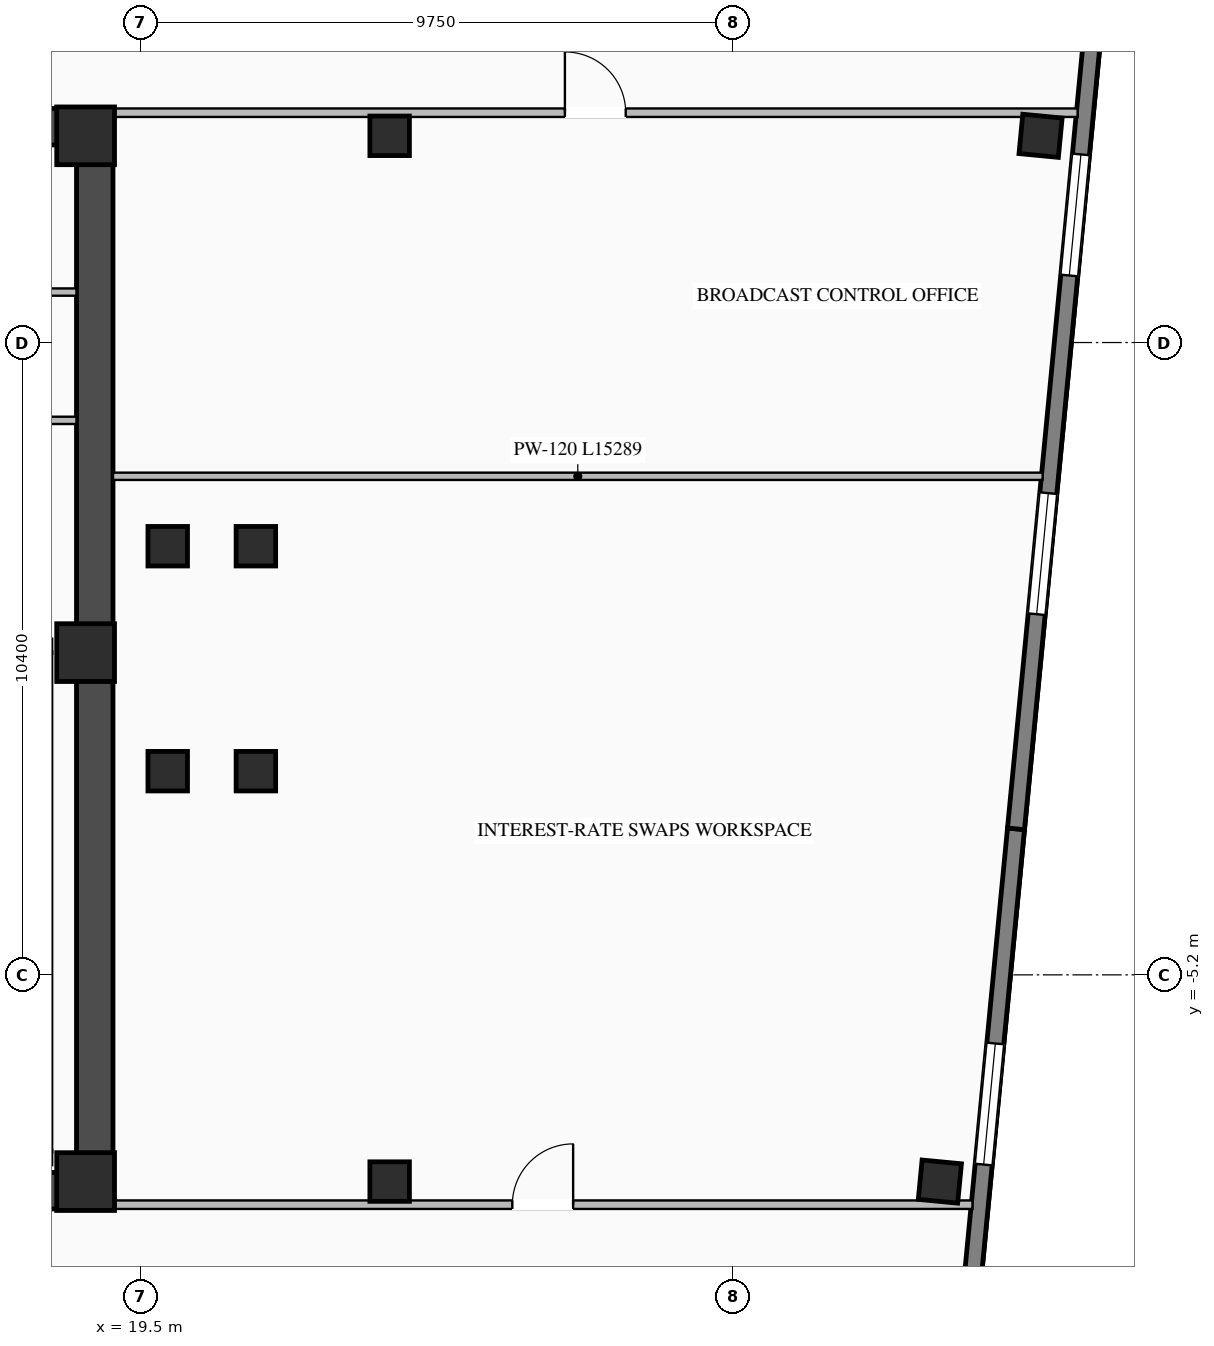
"""IFC4 building model, lengths in metres.
Left out: names, types, materials, properties, quantities, classifications, styles, units other than length and angle.
Written with IfcOpenShell. Run it as: python <this file> out.ifc"""

import sys

from ifc_helpers import new_model, si_unit, direction, frame, frame_2d, origin, origin_2d, place, context, subcontext, project, spatial, rectangle, i_section, extrude, element, fill, save


model = new_model("IFC4")
c1 = context("Model", 3, precision=1e-05, world=origin(), true_north=direction((0.0, 1.0)))
c2 = subcontext(c1, "Body", "Model", "MODEL_VIEW")
j1 = project(units=[si_unit("LENGTHUNIT", "METRE"), si_unit("PLANEANGLEUNIT", "RADIAN")], contexts=[c1])
p1 = place(None, origin())
s1 = spatial("IfcSite", under=j1, at=p1, CompositionType="ELEMENT")
p2 = place(p1, origin())
s2 = spatial("IfcBuilding", under=s1, at=p2, CompositionType="ELEMENT")
p3 = place(p2, frame((0.0, 0.0, 170.75)))
s3 = spatial("IfcBuildingStorey", under=s2, at=p3, CompositionType="ELEMENT", Elevation=170.75)
p4 = place(p3, frame((8.8, -8.75, 0.0), z_axis=(0.0, 0.0, 1.0), x_axis=(1.0, 0.0, 0.0)))
e1 = element("IfcWall", 1, at=p4, inside=s3, PredefinedType="SHEAR", context=c2, shape_type="SweptSolid", body=[
    extrude(rectangle(XDim=10.25, YDim=0.6, at=frame_2d((5.125, 0.0))), origin(), (0.0, 0.0, 1.0), 3.27),
])
p5 = place(p3, frame((8.8, 8.75, 0.0), z_axis=(0.0, 0.0, 1.0), x_axis=(1.0, 0.0, 0.0)))
e2 = element("IfcWall", 2, at=p5, inside=s3, PredefinedType="SHEAR", context=c2, shape_type="SweptSolid", body=[
    extrude(rectangle(XDim=10.25, YDim=0.6, at=frame_2d((5.125, 0.0))), origin(), (0.0, 0.0, 1.0), 3.27),
])
p6 = place(p5, frame((3.25, 0.0, 0.0)))
e3 = element("IfcOpeningElement", 3, at=p6, cuts=e2, PredefinedType="OPENING", context=c2, shape_type="SweptSolid", body=[
    extrude(rectangle(XDim=1.4, YDim=2.05, at=frame_2d((0.7, 1.025))), frame((0.0, 0.31, 0.0), z_axis=(0.0, -1.0, 0.0), x_axis=(1.0, 0.0, 0.0)), (0.0, 0.0, 1.0), 0.62),
])
p7 = place(p3, frame((18.75, -8.45, 0.0), z_axis=(0.0, 0.0, 1.0), x_axis=(0.0, 1.0, 0.0)))
e4 = element("IfcWall", 4, at=p7, inside=s3, PredefinedType="SHEAR", context=c2, shape_type="SweptSolid", body=[
    extrude(rectangle(XDim=16.9, YDim=0.6, at=frame_2d((8.45, 0.0))), origin(), (0.0, 0.0, 1.0), 3.27),
])
for number, where, z_axis, x_axis in (
    (5, (18.6, -8.6, 0.0), (0.0, 0.0, 1.0), (1.0, 0.0, 0.0)),
    (6, (18.6, 0.1, 0.0), (0.0, 0.0, 1.0), (1.0, 0.0, 0.0)),
    (7, (18.6, 8.6, 0.0), (0.0, 0.0, 1.0), (1.0, 0.0, 0.0)),
):
    element("IfcColumn", number, at=place(p3, frame(where, z_axis=z_axis, x_axis=x_axis)), inside=s3, PredefinedType="COLUMN", context=c2, shape_type="SweptSolid", body=[
        extrude(rectangle(XDim=0.95, YDim=0.95, at=origin_2d()), origin(), (0.0, 0.0, 1.0), 3.45),
    ])
for number, where, z_axis, x_axis in (
    (8, (19.95, -1.85, 0.0), (0.0, 0.0, 1.0), (1.0, 0.0, 0.0)),
    (9, (19.95, 1.85, 0.0), (0.0, 0.0, 1.0), (1.0, 0.0, 0.0)),
    (10, (21.4, -1.85, 0.0), (0.0, 0.0, 1.0), (1.0, 0.0, 0.0)),
    (11, (21.4, 1.85, 0.0), (0.0, 0.0, 1.0), (1.0, 0.0, 0.0)),
    (12, (23.6, -8.6, 0.0), (0.0, 0.0, 1.0), (1.0, 0.0, 0.0)),
    (13, (23.6, 8.6, 0.0), (0.0, 0.0, 1.0), (1.0, 0.0, 0.0)),
    (14, (32.649, -8.6, 0.0), (0.0, 0.0, 1.0), (0.995, -0.096, 0.0)),
    (15, (34.305, 8.6, 0.0), (0.0, 0.0, 1.0), (0.995, -0.096, 0.0)),
):
    element("IfcColumn", number, at=place(p3, frame(where, z_axis=z_axis, x_axis=x_axis)), inside=s3, PredefinedType="COLUMN", context=c2, shape_type="SweptSolid", body=[
        extrude(i_section(OverallWidth=0.65, OverallDepth=0.65, WebThickness=0.028, FlangeThickness=0.04, at=origin_2d()), origin(), (0.0, 0.0, 1.0), 3.45),
    ])
p8 = place(p3, frame((33.901, -2.798, 0.0), z_axis=(0.0, 0.0, 1.0), x_axis=(-0.095853434568, -0.99539545864, 0.0)))
e16 = element("IfcWall", 16, at=p8, inside=s3, PredefinedType="STANDARD", context=c2, shape_type="SweptSolid", body=[
    extrude(rectangle(XDim=16.79, YDim=0.28, at=frame_2d((8.395, 0.0))), origin(), (0.0, 0.0, 1.0), 3.25),
])
p9 = place(p8, frame((3.547, 0.0, 0.76)))
e17 = element("IfcOpeningElement", 17, at=p9, cuts=e16, PredefinedType="OPENING", context=c2, shape_type="SweptSolid", body=[
    extrude(rectangle(XDim=2.0, YDim=2.05, at=frame_2d((1.0, 1.025))), frame((0.0, 0.15, 0.0), z_axis=(0.0, -1.0, 0.0), x_axis=(1.0, 0.0, 0.0)), (0.0, 0.0, 1.0), 0.3),
])
p10 = place(p8, frame((10.193, 0.0, 0.76)))
e18 = element("IfcOpeningElement", 18, at=p10, cuts=e16, PredefinedType="OPENING", context=c2, shape_type="SweptSolid", body=[
    extrude(rectangle(XDim=2.0, YDim=2.05, at=frame_2d((1.0, 1.025))), frame((0.0, 0.15, 0.0), z_axis=(0.0, -1.0, 0.0), x_axis=(1.0, 0.0, 0.0)), (0.0, 0.0, 1.0), 0.3),
])
p11 = place(p3, frame((35.51, 13.914, 0.0), z_axis=(0.0, 0.0, 1.0), x_axis=(-0.095839027265, -0.995396845913, 0.0)))
e19 = element("IfcWall", 19, at=p11, inside=s3, PredefinedType="STANDARD", context=c2, shape_type="SweptSolid", body=[
    extrude(rectangle(XDim=16.79, YDim=0.28, at=frame_2d((8.395, 0.0))), origin(), (0.0, 0.0, 1.0), 3.25),
])
p12 = place(p11, frame((5.647, 0.0, 0.76)))
e20 = element("IfcOpeningElement", 20, at=p12, cuts=e19, PredefinedType="OPENING", context=c2, shape_type="SweptSolid", body=[
    extrude(rectangle(XDim=2.0, YDim=2.05, at=frame_2d((1.0, 1.025))), frame((0.0, 0.15, 0.0), z_axis=(0.0, -1.0, 0.0), x_axis=(1.0, 0.0, 0.0)), (0.0, 0.0, 1.0), 0.3),
])
p13 = place(p11, frame((11.243, 0.0, 0.76)))
e21 = element("IfcOpeningElement", 21, at=p13, cuts=e19, PredefinedType="OPENING", context=c2, shape_type="SweptSolid", body=[
    extrude(rectangle(XDim=2.0, YDim=2.05, at=frame_2d((1.0, 1.025))), frame((0.0, 0.15, 0.0), z_axis=(0.0, -1.0, 0.0), x_axis=(1.0, 0.0, 0.0)), (0.0, 0.0, 1.0), 0.3),
])
p14 = place(p3, frame((13.9, 3.92, 0.0), z_axis=(0.0, 0.0, 1.0), x_axis=(1.0, 0.0, 0.0)))
e22 = element("IfcWall", 22, at=p14, inside=s3, PredefinedType="STANDARD", context=c2, shape_type="SweptSolid", body=[
    extrude(rectangle(XDim=4.55, YDim=0.12, at=frame_2d((2.275, 0.0))), origin(), (0.0, 0.0, 1.0), 3.25),
])
p15 = place(p3, frame((16.15, 6.03, 0.0), z_axis=(0.0, 0.0, 1.0), x_axis=(1.0, 0.0, 0.0)))
e23 = element("IfcWall", 23, at=p15, inside=s3, PredefinedType="STANDARD", context=c2, shape_type="SweptSolid", body=[
    extrude(rectangle(XDim=2.3, YDim=0.12, at=frame_2d((1.15, 0.0))), origin(), (0.0, 0.0, 1.0), 3.25),
])
p16 = place(p3, frame((19.05, 8.98, 0.0), z_axis=(0.0, 0.0, 1.0), x_axis=(1.0, 0.0, 0.0)))
e24 = element("IfcWall", 24, at=p16, inside=s3, PredefinedType="STANDARD", context=c2, shape_type="SweptSolid", body=[
    extrude(rectangle(XDim=15.864, YDim=0.14, at=frame_2d((7.932, 0.0))), origin(), (0.0, 0.0, 1.0), 3.25),
])
p17 = place(p16, frame((7.432, 0.0, 0.0)))
e25 = element("IfcOpeningElement", 25, at=p17, cuts=e24, PredefinedType="OPENING", context=c2, shape_type="SweptSolid", body=[
    extrude(rectangle(XDim=1.0, YDim=2.08, at=frame_2d((0.5, 1.04))), frame((0.0, 0.08, 0.0), z_axis=(0.0, -1.0, 0.0), x_axis=(1.0, 0.0, 0.0)), (0.0, 0.0, 1.0), 0.16),
])
p18 = place(p3, frame((19.05, -8.98, 0.0), z_axis=(0.0, 0.0, 1.0), x_axis=(1.0, 0.0, 0.0)))
e26 = element("IfcWall", 26, at=p18, inside=s3, PredefinedType="STANDARD", context=c2, shape_type="SweptSolid", body=[
    extrude(rectangle(XDim=14.135, YDim=0.14, at=frame_2d((7.067, 0.0))), origin(), (0.0, 0.0, 1.0), 3.25),
])
p19 = place(p18, frame((6.567, 0.0, 0.0)))
e27 = element("IfcOpeningElement", 27, at=p19, cuts=e26, PredefinedType="OPENING", context=c2, shape_type="SweptSolid", body=[
    extrude(rectangle(XDim=1.0, YDim=2.08, at=frame_2d((0.5, 1.04))), frame((0.0, 0.08, 0.0), z_axis=(0.0, -1.0, 0.0), x_axis=(1.0, 0.0, 0.0)), (0.0, 0.0, 1.0), 0.16),
])
p20 = place(p3, frame((19.05, 3.0, 0.0), z_axis=(0.0, 0.0, 1.0), x_axis=(1.0, 0.0, 0.0)))
e28 = element("IfcWall", 28, at=p20, inside=s3, PredefinedType="STANDARD", context=c2, shape_type="SweptSolid", body=[
    extrude(rectangle(XDim=15.288, YDim=0.12, at=frame_2d((7.644, 0.0))), origin(), (0.0, 0.0, 1.0), 3.25),
])
p21 = place(p9, origin())
e29 = element("IfcWindow", 29, at=p21, inside=s3, PartitioningType="DOUBLE_PANEL_VERTICAL", PredefinedType="WINDOW", context=c2, shape_type="SweptSolid", body=[
    extrude(rectangle(XDim=2.0, YDim=2.05, at=frame_2d((1.0, 1.025))), frame((0.0, 0.03, 0.0), z_axis=(0.0, -1.0, 0.0), x_axis=(1.0, 0.0, 0.0)), (0.0, 0.0, 1.0), 0.06),
])
fill(e17, e29)
p22 = place(p12, origin())
e30 = element("IfcWindow", 30, at=p22, inside=s3, PartitioningType="DOUBLE_PANEL_VERTICAL", PredefinedType="WINDOW", context=c2, shape_type="SweptSolid", body=[
    extrude(rectangle(XDim=2.0, YDim=2.05, at=frame_2d((1.0, 1.025))), frame((0.0, 0.03, 0.0), z_axis=(0.0, -1.0, 0.0), x_axis=(1.0, 0.0, 0.0)), (0.0, 0.0, 1.0), 0.06),
])
fill(e20, e30)
p23 = place(p13, origin())
e31 = element("IfcWindow", 31, at=p23, inside=s3, PartitioningType="DOUBLE_PANEL_VERTICAL", PredefinedType="WINDOW", context=c2, shape_type="SweptSolid", body=[
    extrude(rectangle(XDim=2.0, YDim=2.05, at=frame_2d((1.0, 1.025))), frame((0.0, 0.03, 0.0), z_axis=(0.0, -1.0, 0.0), x_axis=(1.0, 0.0, 0.0)), (0.0, 0.0, 1.0), 0.06),
])
fill(e21, e31)
p24 = place(p17, origin())
e32 = element("IfcDoor", 32, at=p24, inside=s3, OperationType="SINGLE_SWING_LEFT", PredefinedType="DOOR", context=c2, shape_type="SweptSolid", body=[
    extrude(rectangle(XDim=1.0, YDim=2.08, at=frame_2d((0.5, 1.04))), frame((0.0, 0.025, 0.0), z_axis=(0.0, -1.0, 0.0), x_axis=(1.0, 0.0, 0.0)), (0.0, 0.0, 1.0), 0.05),
])
fill(e25, e32)
p25 = place(p19, origin())
e33 = element("IfcDoor", 33, at=p25, inside=s3, OperationType="SINGLE_SWING_RIGHT", PredefinedType="DOOR", context=c2, shape_type="SweptSolid", body=[
    extrude(rectangle(XDim=1.0, YDim=2.08, at=frame_2d((0.5, 1.04))), frame((0.0, 0.025, 0.0), z_axis=(0.0, -1.0, 0.0), x_axis=(1.0, 0.0, 0.0)), (0.0, 0.0, 1.0), 0.05),
])
fill(e27, e33)
save(model, sys.argv[1])
